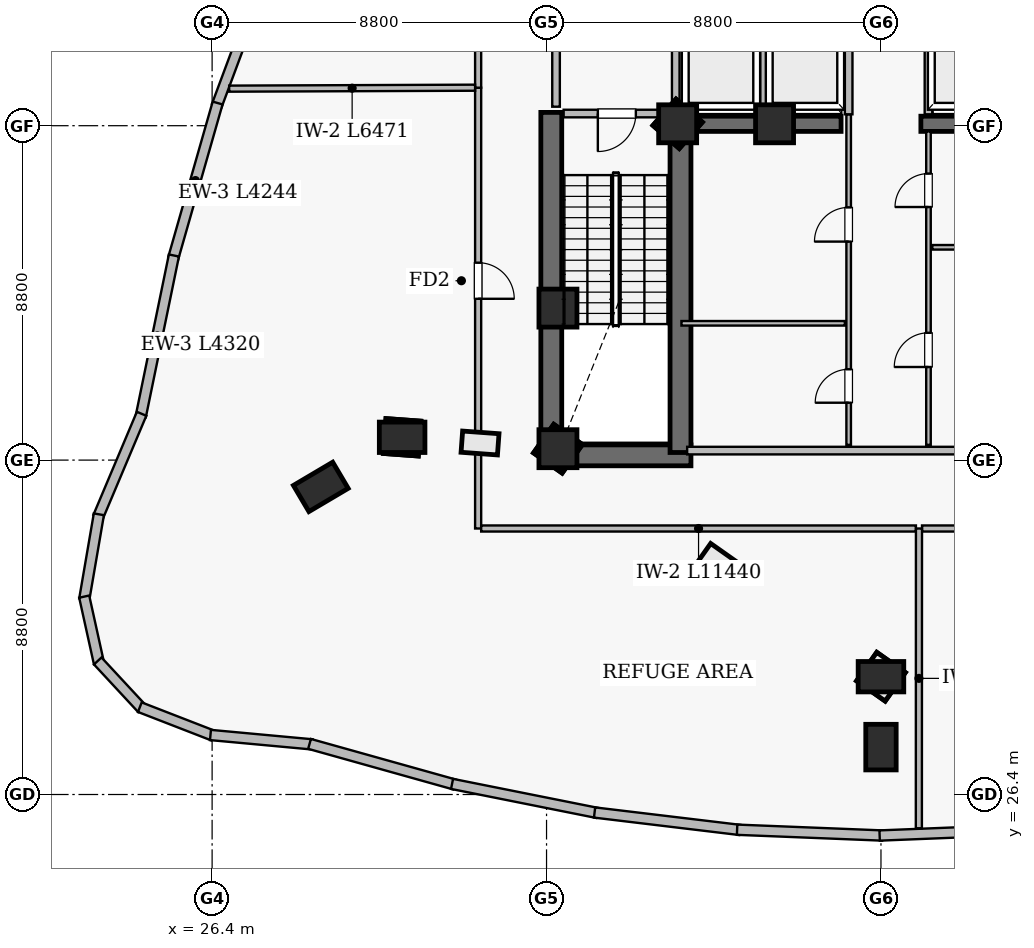
"""IFC4 building model, lengths in metres.
Left out: names, types, materials, properties, quantities, classifications, styles, units other than length and angle.
Written with IfcOpenShell. Run it as: python <this file> out.ifc"""

import sys

from ifc_helpers import new_model, si_unit, direction, frame, frame_2d, origin, origin_2d, place, context, subcontext, project, spatial, rectangle, extrude, element, fill, save


model = new_model("IFC4")
c1 = context("Model", 3, precision=1e-05, world=origin(), true_north=direction((0.0, 1.0)))
c2 = subcontext(c1, "Body", "Model", "MODEL_VIEW")
j1 = project(units=[si_unit("LENGTHUNIT", "METRE"), si_unit("PLANEANGLEUNIT", "RADIAN")], contexts=[c1])
p1 = place(None, origin())
s1 = spatial("IfcSite", under=j1, at=p1, CompositionType="ELEMENT")
p2 = place(p1, origin())
s2 = spatial("IfcBuilding", under=s1, at=p2, CompositionType="ELEMENT")
p3 = place(p2, frame((0.0, 0.0, 184.4)))
s3 = spatial("IfcBuildingStorey", under=s2, at=p3, CompositionType="ELEMENT", Elevation=184.4)
p4 = place(p3, frame((35.05, 35.325, 0.0), z_axis=(0.0, 0.0, 1.0), x_axis=(1.0, 0.0, 0.0)))
e1 = element("IfcWall", 1, at=p4, inside=s3, PredefinedType="SHEAR", context=c2, shape_type="SweptSolid", body=[
    extrude(rectangle(XDim=3.95, YDim=0.55, at=frame_2d((1.975, 0.0))), origin(), (0.0, 0.0, 1.0), 5.1),
])
p5 = place(p3, frame((35.325, 35.05, 0.0), z_axis=(0.0, 0.0, 1.0), x_axis=(0.0, 1.0, 0.0)))
e2 = element("IfcWall", 2, at=p5, inside=s3, PredefinedType="SHEAR", context=c2, shape_type="SweptSolid", body=[
    extrude(rectangle(XDim=9.3, YDim=0.55, at=frame_2d((4.65, 0.0))), origin(), (0.0, 0.0, 1.0), 5.1),
])
p6 = place(p3, frame((38.725, 35.4, 0.0), z_axis=(0.0, 0.0, 1.0), x_axis=(0.0, 1.0, 0.0)))
e3 = element("IfcWall", 3, at=p6, inside=s3, PredefinedType="SHEAR", context=c2, shape_type="SweptSolid", body=[
    extrude(rectangle(XDim=8.95, YDim=0.55, at=frame_2d((4.475, 0.0))), origin(), (0.0, 0.0, 1.0), 5.1),
])
for number, where, z_axis, x_axis in (
    (4, (38.75, 44.05, 0.0), (0.0, 0.0, 1.0), (1.0, 0.0, 0.0)),
    (5, (45.05, 44.05, 0.0), (0.0, 0.0, 1.0), (1.0, 0.0, 0.0)),
):
    element("IfcWall", number, at=place(p3, frame(where, z_axis=z_axis, x_axis=x_axis)), inside=s3, PredefinedType="SHEAR", context=c2, shape_type="SweptSolid", body=[
        extrude(rectangle(XDim=4.2, YDim=0.4, at=frame_2d((2.1, 0.0))), origin(), (0.0, 0.0, 1.0), 5.1),
    ])
for number, where, z_axis, x_axis in (
    (6, (35.5, 35.5, 0.0), (0.0, 0.0, 1.0), (1.0, 0.0, 0.0)),
    (7, (38.65, 44.05, 0.0), (0.0, 0.0, 1.0), (1.0, 0.0, 0.0)),
    (8, (35.5, 39.2, 0.0), (0.0, 0.0, 1.0), (1.0, 0.0, 0.0)),
    (9, (41.2, 44.05, 0.0), (0.0, 0.0, 1.0), (1.0, 0.0, 0.0)),
):
    element("IfcColumn", number, at=place(p3, frame(where, z_axis=z_axis, x_axis=x_axis)), inside=s3, PredefinedType="COLUMN", context=c2, shape_type="SweptSolid", body=[
        extrude(rectangle(XDim=1.0, YDim=1.0, at=origin_2d()), origin(), (0.0, 0.0, 1.0), 5.4),
    ])
for number, where, z_axis, x_axis in (
    (10, (44.0, 29.5, 0.0), (0.0, 0.0, 1.0), (1.0, 0.0, 0.0)),
    (11, (31.4, 35.8, 0.0), (0.0, 0.0, 1.0), (1.0, 0.0, 0.0)),
    (12, (44.0, 27.647, 0.0), (0.0, 0.0, 1.0), (0.0, 1.0, 0.0)),
    (13, (29.26, 34.495, 0.0), (0.0, 0.0, 1.0), (0.861, 0.509, 0.0)),
):
    element("IfcColumn", number, at=place(p3, frame(where, z_axis=z_axis, x_axis=x_axis)), inside=s3, PredefinedType="COLUMN", context=c2, shape_type="SweptSolid", body=[
        extrude(rectangle(XDim=1.2, YDim=0.8, at=origin_2d()), origin(), (0.0, 0.0, 1.0), 5.4),
    ])
p7 = place(p3, frame((27.986, 48.459, 0.0), z_axis=(0.0, 0.0, 1.0), x_axis=(-0.349022784807, -0.937114238333, 0.0)))
e14 = element("IfcWall", 14, at=p7, inside=s3, PredefinedType="SOLIDWALL", context=c2, shape_type="SweptSolid", body=[
    extrude(rectangle(XDim=4.192, YDim=0.27, at=frame_2d((2.096, 0.0))), origin(), (0.0, 0.0, 1.0), 5.1),
])
p8 = place(p3, frame((26.545, 44.597, 0.0), z_axis=(0.0, 0.0, 1.0), x_axis=(-0.274964238992, -0.961454454083, 0.0)))
e15 = element("IfcWall", 15, at=p8, inside=s3, PredefinedType="SOLIDWALL", context=c2, shape_type="SweptSolid", body=[
    extrude(rectangle(XDim=4.244, YDim=0.27, at=frame_2d((2.122, 0.0))), origin(), (0.0, 0.0, 1.0), 5.1),
])
p9 = place(p3, frame((25.395, 40.584, 0.0), z_axis=(0.0, 0.0, 1.0), x_axis=(-0.201568414005, -0.979474437888, 0.0)))
e16 = element("IfcWall", 16, at=p9, inside=s3, PredefinedType="SOLIDWALL", context=c2, shape_type="SweptSolid", body=[
    extrude(rectangle(XDim=4.32, YDim=0.27, at=frame_2d((2.16, 0.0))), origin(), (0.0, 0.0, 1.0), 5.1),
])
p10 = place(p3, frame((24.544, 36.419, 0.0), z_axis=(0.0, 0.0, 1.0), x_axis=(-0.388546458819, -0.921429134193, 0.0)))
e17 = element("IfcWall", 17, at=p10, inside=s3, PredefinedType="SOLIDWALL", context=c2, shape_type="SweptSolid", body=[
    extrude(rectangle(XDim=2.943, YDim=0.27, at=frame_2d((1.472, 0.0))), origin(), (0.0, 0.0, 1.0), 5.1),
])
p11 = place(p3, frame((23.42, 33.774, 0.0), z_axis=(0.0, 0.0, 1.0), x_axis=(-0.169355267958, -0.985555068586, 0.0)))
e18 = element("IfcWall", 18, at=p11, inside=s3, PredefinedType="SOLIDWALL", context=c2, shape_type="SweptSolid", body=[
    extrude(rectangle(XDim=2.268, YDim=0.27, at=frame_2d((1.134, 0.0))), origin(), (0.0, 0.0, 1.0), 5.1),
])
p12 = place(p3, frame((23.034, 31.607, 0.0), z_axis=(0.0, 0.0, 1.0), x_axis=(0.215792916571, -0.976439151795, 0.0)))
e19 = element("IfcWall", 19, at=p12, inside=s3, PredefinedType="SOLIDWALL", context=c2, shape_type="SweptSolid", body=[
    extrude(rectangle(XDim=1.795, YDim=0.27, at=frame_2d((0.898, 0.0))), origin(), (0.0, 0.0, 1.0), 5.1),
])
p13 = place(p3, frame((23.39, 29.914, 0.0), z_axis=(0.0, 0.0, 1.0), x_axis=(0.680078990902, -0.733138845058, 0.0)))
e20 = element("IfcWall", 20, at=p13, inside=s3, PredefinedType="SOLIDWALL", context=c2, shape_type="SweptSolid", body=[
    extrude(rectangle(XDim=1.712, YDim=0.27, at=frame_2d((0.856, 0.0))), origin(), (0.0, 0.0, 1.0), 5.1),
])
p14 = place(p3, frame((24.498, 28.698, 0.0), z_axis=(0.0, 0.0, 1.0), x_axis=(0.93229707956, -0.361693455074, 0.0)))
e21 = element("IfcWall", 21, at=p14, inside=s3, PredefinedType="SOLIDWALL", context=c2, shape_type="SweptSolid", body=[
    extrude(rectangle(XDim=2.066, YDim=0.27, at=frame_2d((1.033, 0.0))), origin(), (0.0, 0.0, 1.0), 5.1),
])
p15 = place(p3, frame((26.357, 27.966, 0.0), z_axis=(0.0, 0.0, 1.0), x_axis=(0.995762583404, -0.09196128257, 0.0)))
e22 = element("IfcWall", 22, at=p15, inside=s3, PredefinedType="SOLIDWALL", context=c2, shape_type="SweptSolid", body=[
    extrude(rectangle(XDim=2.687, YDim=0.27, at=frame_2d((1.343, 0.0))), origin(), (0.0, 0.0, 1.0), 5.1),
])
p16 = place(p3, frame((28.963, 27.732, 0.0), z_axis=(0.0, 0.0, 1.0), x_axis=(0.962978726961, -0.26957739412, 0.0)))
e23 = element("IfcWall", 23, at=p16, inside=s3, PredefinedType="SOLIDWALL", context=c2, shape_type="SweptSolid", body=[
    extrude(rectangle(XDim=3.965, YDim=0.27, at=frame_2d((1.982, 0.0))), origin(), (0.0, 0.0, 1.0), 5.1),
])
p17 = place(p3, frame((32.714, 26.679, 0.0), z_axis=(0.0, 0.0, 1.0), x_axis=(0.980578264817, -0.196128189121, 0.0)))
e24 = element("IfcWall", 24, at=p17, inside=s3, PredefinedType="SOLIDWALL", context=c2, shape_type="SweptSolid", body=[
    extrude(rectangle(XDim=3.895, YDim=0.27, at=frame_2d((1.948, 0.0))), origin(), (0.0, 0.0, 1.0), 5.1),
])
p18 = place(p3, frame((36.464, 25.926, 0.0), z_axis=(0.0, 0.0, 1.0), x_axis=(0.992875036937, -0.119160232577, 0.0)))
e25 = element("IfcWall", 25, at=p18, inside=s3, PredefinedType="SOLIDWALL", context=c2, shape_type="SweptSolid", body=[
    extrude(rectangle(XDim=3.848, YDim=0.27, at=frame_2d((1.924, 0.0))), origin(), (0.0, 0.0, 1.0), 5.1),
])
for number, where, z_axis, x_axis in (
    (26, (40.214, 25.473, 0.0), (0.0, 0.0, 1.0), (0.999, -0.04, 0.0)),
    (27, (43.965, 25.321, 0.0), (0.0, 0.0, 1.0), (0.999, 0.04, 0.0)),
):
    element("IfcWall", number, at=place(p3, frame(where, z_axis=z_axis, x_axis=x_axis)), inside=s3, PredefinedType="SOLIDWALL", context=c2, shape_type="SweptSolid", body=[
        extrude(rectangle(XDim=3.824, YDim=0.27, at=frame_2d((1.912, 0.0))), origin(), (0.0, 0.0, 1.0), 5.1),
    ])
p19 = place(p3, frame((33.4, 45.0, 0.0), z_axis=(0.0, 0.0, 1.0), x_axis=(0.0, -1.0, 0.0)))
e28 = element("IfcWall", 28, at=p19, inside=s3, PredefinedType="SOLIDWALL", context=c2, shape_type="SweptSolid", body=[
    extrude(rectangle(XDim=11.6, YDim=0.16, at=frame_2d((5.8, 0.0))), origin(), (0.0, 0.0, 1.0), 4.188),
])
p20 = place(p19, frame((4.605, 0.0, 0.0)))
e29 = element("IfcOpeningElement", 29, at=p20, cuts=e28, PredefinedType="OPENING", context=c2, shape_type="SweptSolid", body=[
    extrude(rectangle(XDim=0.95, YDim=2.15, at=frame_2d((0.475, 1.075))), frame((0.0, 0.09, 0.0), z_axis=(0.0, -1.0, 0.0), x_axis=(1.0, 0.0, 0.0)), (0.0, 0.0, 1.0), 0.18),
])
p21 = place(p3, frame((43.15, 35.6, 0.0), z_axis=(0.0, 0.0, 1.0), x_axis=(0.0, 1.0, 0.0)))
e30 = element("IfcWall", 30, at=p21, inside=s3, PredefinedType="PARTITIONING", context=c2, shape_type="SweptSolid", body=[
    extrude(rectangle(XDim=8.7, YDim=0.12, at=frame_2d((4.35, 0.0))), origin(), (0.0, 0.0, 1.0), 5.1),
])
p22 = place(p21, frame((1.11, 0.0, 0.0)))
e31 = element("IfcOpeningElement", 31, at=p22, cuts=e30, PredefinedType="OPENING", context=c2, shape_type="SweptSolid", body=[
    extrude(rectangle(XDim=0.88, YDim=2.1, at=frame_2d((0.44, 1.05))), frame((0.0, 0.07, 0.0), z_axis=(0.0, -1.0, 0.0), x_axis=(1.0, 0.0, 0.0)), (0.0, 0.0, 1.0), 0.14),
])
p23 = place(p21, frame((5.35, 0.0, 0.0)))
e32 = element("IfcOpeningElement", 32, at=p23, cuts=e30, PredefinedType="OPENING", context=c2, shape_type="SweptSolid", body=[
    extrude(rectangle(XDim=0.9, YDim=2.1, at=frame_2d((0.45, 1.05))), frame((0.0, 0.07, 0.0), z_axis=(0.0, -1.0, 0.0), x_axis=(1.0, 0.0, 0.0)), (0.0, 0.0, 1.0), 0.14),
])
p24 = place(p3, frame((45.25, 35.6, 0.0), z_axis=(0.0, 0.0, 1.0), x_axis=(0.0, 1.0, 0.0)))
e33 = element("IfcWall", 33, at=p24, inside=s3, PredefinedType="PARTITIONING", context=c2, shape_type="SweptSolid", body=[
    extrude(rectangle(XDim=8.25, YDim=0.12, at=frame_2d((4.125, 0.0))), origin(), (0.0, 0.0, 1.0), 5.1),
])
p25 = place(p24, frame((2.05, 0.0, 0.0)))
e34 = element("IfcOpeningElement", 34, at=p25, cuts=e33, PredefinedType="OPENING", context=c2, shape_type="SweptSolid", body=[
    extrude(rectangle(XDim=0.9, YDim=2.1, at=frame_2d((0.45, 1.05))), frame((0.0, 0.07, 0.0), z_axis=(0.0, -1.0, 0.0), x_axis=(1.0, 0.0, 0.0)), (0.0, 0.0, 1.0), 0.14),
])
p26 = place(p24, frame((6.26, 0.0, 0.0)))
e35 = element("IfcOpeningElement", 35, at=p26, cuts=e33, PredefinedType="OPENING", context=c2, shape_type="SweptSolid", body=[
    extrude(rectangle(XDim=0.88, YDim=2.1, at=frame_2d((0.44, 1.05))), frame((0.0, 0.07, 0.0), z_axis=(0.0, -1.0, 0.0), x_axis=(1.0, 0.0, 0.0)), (0.0, 0.0, 1.0), 0.14),
])
p27 = place(p3, frame((35.45, 44.5, 0.0), z_axis=(0.0, 0.0, 1.0), x_axis=(0.0, 1.0, 0.0)))
e36 = element("IfcWall", 36, at=p27, inside=s3, PredefinedType="SOLIDWALL", context=c2, shape_type="SweptSolid", body=[
    extrude(rectangle(XDim=7.92, YDim=0.2, at=frame_2d((3.96, 0.0))), origin(), (0.0, 0.0, 1.0), 5.1),
])
p28 = place(p27, frame((2.6, 0.0, 0.0)))
e37 = element("IfcOpeningElement", 37, at=p28, cuts=e36, PredefinedType="OPENING", context=c2, shape_type="SweptSolid", body=[
    extrude(rectangle(XDim=1.0, YDim=2.15, at=frame_2d((0.5, 1.075))), frame((0.0, 0.11, 0.0), z_axis=(0.0, -1.0, 0.0), x_axis=(1.0, 0.0, 0.0)), (0.0, 0.0, 1.0), 0.22),
])
p29 = place(p3, frame((38.6, 44.5, 0.0), z_axis=(0.0, 0.0, 1.0), x_axis=(0.0, 1.0, 0.0)))
e38 = element("IfcWall", 38, at=p29, inside=s3, PredefinedType="SOLIDWALL", context=c2, shape_type="SweptSolid", body=[
    extrude(rectangle(XDim=7.92, YDim=0.2, at=frame_2d((3.96, 0.0))), origin(), (0.0, 0.0, 1.0), 5.1),
])
p30 = place(p29, frame((3.425, 0.0, 0.0)))
e39 = element("IfcOpeningElement", 39, at=p30, cuts=e38, PredefinedType="OPENING", context=c2, shape_type="SweptSolid", body=[
    extrude(rectangle(XDim=0.95, YDim=2.15, at=frame_2d((0.475, 1.075))), frame((0.0, 0.11, 0.0), z_axis=(0.0, -1.0, 0.0), x_axis=(1.0, 0.0, 0.0)), (0.0, 0.0, 1.0), 0.22),
])
p31 = place(p3, frame((35.65, 44.32, 0.0), z_axis=(0.0, 0.0, 1.0), x_axis=(1.0, 0.0, 0.0)))
e40 = element("IfcWall", 40, at=p31, inside=s3, PredefinedType="SOLIDWALL", context=c2, shape_type="SweptSolid", body=[
    extrude(rectangle(XDim=2.8, YDim=0.2, at=frame_2d((1.4, 0.0))), origin(), (0.0, 0.0, 1.0), 5.1),
])
p32 = place(p31, frame((0.9, 0.0, 0.0)))
e41 = element("IfcOpeningElement", 41, at=p32, cuts=e40, PredefinedType="OPENING", context=c2, shape_type="SweptSolid", body=[
    extrude(rectangle(XDim=1.0, YDim=2.15, at=frame_2d((0.5, 1.075))), frame((0.0, 0.11, 0.0), z_axis=(0.0, -1.0, 0.0), x_axis=(1.0, 0.0, 0.0)), (0.0, 0.0, 1.0), 0.22),
])
p33 = place(p3, frame((33.48, 33.4, 0.0), z_axis=(0.0, 0.0, 1.0), x_axis=(1.0, 0.0, 0.0)))
e42 = element("IfcWall", 42, at=p33, inside=s3, PredefinedType="SOLIDWALL", context=c2, shape_type="SweptSolid", body=[
    extrude(rectangle(XDim=11.44, YDim=0.16, at=frame_2d((5.72, 0.0))), origin(), (0.0, 0.0, 1.0), 4.188),
])
p34 = place(p3, frame((38.9, 35.45, 0.0), z_axis=(0.0, 0.0, 1.0), x_axis=(1.0, 0.0, 0.0)))
e43 = element("IfcWall", 43, at=p34, inside=s3, PredefinedType="SOLIDWALL", context=c2, shape_type="SweptSolid", body=[
    extrude(rectangle(XDim=10.2, YDim=0.2, at=frame_2d((5.1, 0.0))), origin(), (0.0, 0.0, 1.0), 5.1),
])
p35 = place(p3, frame((33.4, 54.6, 0.0), z_axis=(0.0, 0.0, 1.0), x_axis=(0.0, -1.0, 0.0)))
e44 = element("IfcWall", 44, at=p35, inside=s3, PredefinedType="SOLIDWALL", context=c2, shape_type="SweptSolid", body=[
    extrude(rectangle(XDim=9.6, YDim=0.16, at=frame_2d((4.8, 0.0))), origin(), (0.0, 0.0, 1.0), 4.188),
])
p36 = place(p3, frame((45.08, 33.4, 0.0), z_axis=(0.0, 0.0, 1.0), x_axis=(1.0, 0.0, 0.0)))
e45 = element("IfcWall", 45, at=p36, inside=s3, PredefinedType="SOLIDWALL", context=c2, shape_type="SweptSolid", body=[
    extrude(rectangle(XDim=9.44, YDim=0.16, at=frame_2d((4.72, 0.0))), origin(), (0.0, 0.0, 1.0), 4.188),
])
p37 = place(p3, frame((44.997, 25.512, 0.0), z_axis=(0.0, 0.0, 1.0), x_axis=(0.000371413512, 0.999999931026, 0.0)))
e46 = element("IfcWall", 46, at=p37, inside=s3, PredefinedType="SOLIDWALL", context=c2, shape_type="SweptSolid", body=[
    extrude(rectangle(XDim=7.888, YDim=0.16, at=frame_2d((3.944, 0.0))), origin(), (0.0, 0.0, 1.0), 4.188),
])
p38 = place(p3, frame((33.32, 45.0, 0.0), z_axis=(0.0, 0.0, 1.0), x_axis=(-0.999992595258, -0.003848302008, 0.0)))
e47 = element("IfcWall", 47, at=p38, inside=s3, PredefinedType="SOLIDWALL", context=c2, shape_type="SweptSolid", body=[
    extrude(rectangle(XDim=6.471, YDim=0.16, at=frame_2d((3.235, 0.0))), origin(), (0.0, 0.0, 1.0), 4.188),
])
p39 = place(p3, frame((38.75, 38.8, 0.0), z_axis=(0.0, 0.0, 1.0), x_axis=(1.0, 0.0, 0.0)))
e48 = element("IfcWall", 48, at=p39, inside=s3, PredefinedType="PARTITIONING", context=c2, shape_type="SweptSolid", body=[
    extrude(rectangle(XDim=4.3, YDim=0.12, at=frame_2d((2.15, 0.0))), origin(), (0.0, 0.0, 1.0), 5.1),
])
p40 = place(p3, frame((45.35, 40.8, 0.0), z_axis=(0.0, 0.0, 1.0), x_axis=(1.0, 0.0, 0.0)))
e49 = element("IfcWall", 49, at=p40, inside=s3, PredefinedType="PARTITIONING", context=c2, shape_type="SweptSolid", body=[
    extrude(rectangle(XDim=3.9, YDim=0.12, at=frame_2d((1.95, 0.0))), origin(), (0.0, 0.0, 1.0), 5.1),
])
for number, where, z_axis, x_axis in (
    (50, (43.15, 44.3, 0.0), (0.0, 0.0, 1.0), (0.0, 1.0, 0.0)),
    (51, (45.25, 44.3, 0.0), (0.0, 0.0, 1.0), (0.0, 1.0, 0.0)),
):
    element("IfcWall", number, at=place(p3, frame(where, z_axis=z_axis, x_axis=x_axis)), inside=s3, PredefinedType="SOLIDWALL", context=c2, shape_type="SweptSolid", body=[
        extrude(rectangle(XDim=2.58, YDim=0.2, at=frame_2d((1.29, 0.0))), origin(), (0.0, 0.0, 1.0), 5.1),
    ])
p41 = place(p3, frame((40.9, 44.3, 0.0), z_axis=(0.0, 0.0, 1.0), x_axis=(0.0, 1.0, 0.0)))
e52 = element("IfcWall", 52, at=p41, inside=s3, PredefinedType="SOLIDWALL", context=c2, shape_type="SweptSolid", body=[
    extrude(rectangle(XDim=2.55, YDim=0.16, at=frame_2d((1.275, 0.0))), origin(), (0.0, 0.0, 1.0), 5.1),
])
p42 = place(p32, frame((1.0, 0.0, 0.0), z_axis=(0.0, 0.0, 1.0), x_axis=(-1.0, 0.0, 0.0)))
e53 = element("IfcDoor", 53, at=p42, inside=s3, OperationType="SINGLE_SWING_LEFT", PredefinedType="DOOR", context=c2, shape_type="SweptSolid", body=[
    extrude(rectangle(XDim=1.0, YDim=2.15, at=frame_2d((0.5, 1.075))), frame((0.0, 0.025, 0.0), z_axis=(0.0, -1.0, 0.0), x_axis=(1.0, 0.0, 0.0)), (0.0, 0.0, 1.0), 0.05),
])
fill(e41, e53)
p43 = place(p22, origin())
e54 = element("IfcDoor", 54, at=p43, inside=s3, OperationType="SINGLE_SWING_LEFT", PredefinedType="DOOR", context=c2, shape_type="SweptSolid", body=[
    extrude(rectangle(XDim=0.88, YDim=2.1, at=frame_2d((0.44, 1.05))), frame((0.0, 0.025, 0.0), z_axis=(0.0, -1.0, 0.0), x_axis=(1.0, 0.0, 0.0)), (0.0, 0.0, 1.0), 0.05),
])
fill(e31, e54)
p44 = place(p23, origin())
e55 = element("IfcDoor", 55, at=p44, inside=s3, OperationType="SINGLE_SWING_LEFT", PredefinedType="DOOR", context=c2, shape_type="SweptSolid", body=[
    extrude(rectangle(XDim=0.9, YDim=2.1, at=frame_2d((0.45, 1.05))), frame((0.0, 0.025, 0.0), z_axis=(0.0, -1.0, 0.0), x_axis=(1.0, 0.0, 0.0)), (0.0, 0.0, 1.0), 0.05),
])
fill(e32, e55)
p45 = place(p25, origin())
e56 = element("IfcDoor", 56, at=p45, inside=s3, OperationType="SINGLE_SWING_LEFT", PredefinedType="DOOR", context=c2, shape_type="SweptSolid", body=[
    extrude(rectangle(XDim=0.9, YDim=2.1, at=frame_2d((0.45, 1.05))), frame((0.0, 0.025, 0.0), z_axis=(0.0, -1.0, 0.0), x_axis=(1.0, 0.0, 0.0)), (0.0, 0.0, 1.0), 0.05),
])
fill(e34, e56)
p46 = place(p26, origin())
e57 = element("IfcDoor", 57, at=p46, inside=s3, OperationType="SINGLE_SWING_LEFT", PredefinedType="DOOR", context=c2, shape_type="SweptSolid", body=[
    extrude(rectangle(XDim=0.88, YDim=2.1, at=frame_2d((0.44, 1.05))), frame((0.0, 0.025, 0.0), z_axis=(0.0, -1.0, 0.0), x_axis=(1.0, 0.0, 0.0)), (0.0, 0.0, 1.0), 0.05),
])
fill(e35, e57)
p47 = place(p20, origin())
e58 = element("IfcDoor", 58, at=p47, inside=s3, OperationType="SINGLE_SWING_RIGHT", PredefinedType="DOOR", context=c2, shape_type="SweptSolid", body=[
    extrude(rectangle(XDim=0.95, YDim=2.15, at=frame_2d((0.475, 1.075))), frame((0.0, 0.025, 0.0), z_axis=(0.0, -1.0, 0.0), x_axis=(1.0, 0.0, 0.0)), (0.0, 0.0, 1.0), 0.05),
])
fill(e29, e58)
save(model, sys.argv[1])
